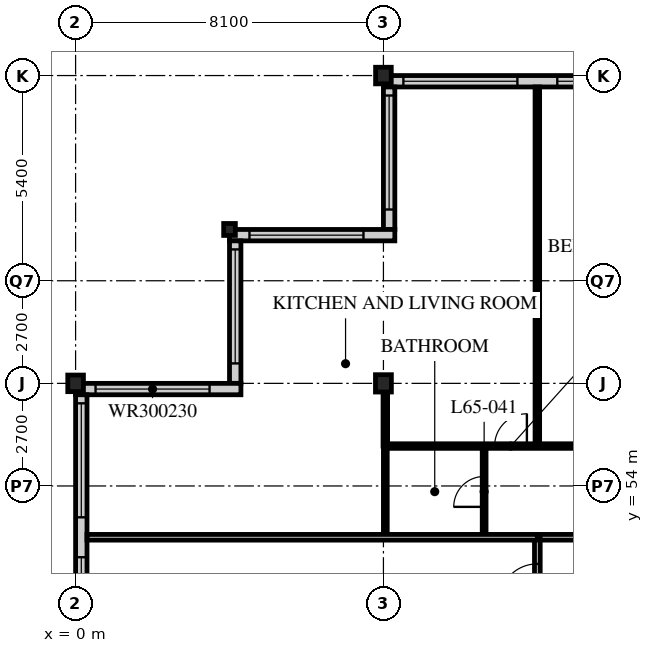
"""IFC4 building model, lengths in metres.
Left out: names, types, materials, properties, quantities, classifications, styles, units other than length and angle.
Written with IfcOpenShell. Run it as: python <this file> out.ifc"""

import sys

from ifc_helpers import new_model, si_unit, direction, frame, frame_2d, origin, origin_2d, place, context, subcontext, project, spatial, rectangle, i_section, extrude, element, fill, save


model = new_model("IFC4")
c1 = context("Model", 3, precision=1e-05, world=origin(), true_north=direction((0.0, 1.0)))
c2 = subcontext(c1, "Body", "Model", "MODEL_VIEW")
j1 = project(units=[si_unit("LENGTHUNIT", "METRE"), si_unit("PLANEANGLEUNIT", "RADIAN")], contexts=[c1])
p1 = place(None, origin())
s1 = spatial("IfcSite", under=j1, at=p1, CompositionType="ELEMENT")
p2 = place(p1, origin())
s2 = spatial("IfcBuilding", under=s1, at=p2, CompositionType="ELEMENT")
p3 = place(p2, frame((0.0, 0.0, 254.1)))
s3 = spatial("IfcBuildingStorey", under=s2, at=p3, CompositionType="ELEMENT", Elevation=254.1)
p4 = place(p3, frame((0.0, 56.7, 0.0), z_axis=(0.0, 0.0, 1.0), x_axis=(1.0, 0.0, 0.0)))
e1 = element("IfcColumn", 1, at=p4, inside=s3, PredefinedType="COLUMN", context=c2, shape_type="SweptSolid", body=[
    extrude(i_section(OverallWidth=0.412, OverallDepth=0.437, WebThickness=0.036, FlangeThickness=0.058, FilletRadius=0.015, at=origin_2d()), origin(), (0.0, 0.0, 1.0), 3.9),
])
p5 = place(p3, frame((4.05, 60.75, 0.0), z_axis=(0.0, 0.0, 1.0), x_axis=(1.0, 0.0, 0.0)))
e2 = element("IfcColumn", 2, at=p5, inside=s3, PredefinedType="COLUMN", context=c2, shape_type="SweptSolid", body=[
    extrude(i_section(OverallWidth=0.307, OverallDepth=0.314, WebThickness=0.012, FlangeThickness=0.019, FilletRadius=0.015, at=origin_2d()), origin(), (0.0, 0.0, 1.0), 3.9),
])
p6 = place(p3, frame((8.1, 56.7, 0.0), z_axis=(0.0, 0.0, 1.0), x_axis=(1.0, 0.0, 0.0)))
e3 = element("IfcColumn", 3, at=p6, inside=s3, PredefinedType="COLUMN", context=c2, shape_type="SweptSolid", body=[
    extrude(i_section(OverallWidth=0.418, OverallDepth=0.456, WebThickness=0.042, FlangeThickness=0.067, FilletRadius=0.015, at=origin_2d()), origin(), (0.0, 0.0, 1.0), 3.9),
])
p7 = place(p3, frame((8.1, 64.8, 0.0), z_axis=(0.0, 0.0, 1.0), x_axis=(1.0, 0.0, 0.0)))
e4 = element("IfcColumn", 4, at=p7, inside=s3, PredefinedType="COLUMN", context=c2, shape_type="SweptSolid", body=[
    extrude(i_section(OverallWidth=0.412, OverallDepth=0.437, WebThickness=0.036, FlangeThickness=0.058, FilletRadius=0.015, at=origin_2d()), origin(), (0.0, 0.0, 1.0), 3.9),
])
p8 = place(p3, frame((48.3, 64.65, 0.0), z_axis=(0.0, 0.0, 1.0), x_axis=(-1.0, 0.0, 0.0)))
e5 = element("IfcWall", 5, at=p8, inside=s3, PredefinedType="SOLIDWALL", context=c2, shape_type="SweptSolid", body=[
    extrude(rectangle(XDim=40.2, YDim=0.3, at=frame_2d((20.1, 0.0))), origin(), (0.0, 0.0, 1.0), 3.69),
])
p9 = place(p8, frame((0.225, 0.0, 0.6)))
e6 = element("IfcOpeningElement", 6, at=p9, cuts=e5, PredefinedType="OPENING", context=c2, shape_type="SweptSolid", body=[
    extrude(rectangle(XDim=3.0, YDim=2.4, at=frame_2d((1.5, 1.2))), frame((0.0, 0.16, 0.0), z_axis=(0.0, -1.0, 0.0), x_axis=(1.0, 0.0, 0.0)), (0.0, 0.0, 1.0), 0.32),
])
p10 = place(p8, frame((4.275, 0.0, 0.6)))
e7 = element("IfcOpeningElement", 7, at=p10, cuts=e5, PredefinedType="OPENING", context=c2, shape_type="SweptSolid", body=[
    extrude(rectangle(XDim=3.0, YDim=2.4, at=frame_2d((1.5, 1.2))), frame((0.0, 0.16, 0.0), z_axis=(0.0, -1.0, 0.0), x_axis=(1.0, 0.0, 0.0)), (0.0, 0.0, 1.0), 0.32),
])
p11 = place(p8, frame((8.325, 0.0, 0.6)))
e8 = element("IfcOpeningElement", 8, at=p11, cuts=e5, PredefinedType="OPENING", context=c2, shape_type="SweptSolid", body=[
    extrude(rectangle(XDim=3.0, YDim=2.4, at=frame_2d((1.5, 1.2))), frame((0.0, 0.16, 0.0), z_axis=(0.0, -1.0, 0.0), x_axis=(1.0, 0.0, 0.0)), (0.0, 0.0, 1.0), 0.32),
])
p12 = place(p8, frame((12.375, 0.0, 0.6)))
e9 = element("IfcOpeningElement", 9, at=p12, cuts=e5, PredefinedType="OPENING", context=c2, shape_type="SweptSolid", body=[
    extrude(rectangle(XDim=3.0, YDim=2.4, at=frame_2d((1.5, 1.2))), frame((0.0, 0.16, 0.0), z_axis=(0.0, -1.0, 0.0), x_axis=(1.0, 0.0, 0.0)), (0.0, 0.0, 1.0), 0.32),
])
p13 = place(p8, frame((16.425, 0.0, 0.6)))
e10 = element("IfcOpeningElement", 10, at=p13, cuts=e5, PredefinedType="OPENING", context=c2, shape_type="SweptSolid", body=[
    extrude(rectangle(XDim=3.0, YDim=2.4, at=frame_2d((1.5, 1.2))), frame((0.0, 0.16, 0.0), z_axis=(0.0, -1.0, 0.0), x_axis=(1.0, 0.0, 0.0)), (0.0, 0.0, 1.0), 0.32),
])
p14 = place(p8, frame((20.475, 0.0, 0.6)))
e11 = element("IfcOpeningElement", 11, at=p14, cuts=e5, PredefinedType="OPENING", context=c2, shape_type="SweptSolid", body=[
    extrude(rectangle(XDim=3.0, YDim=2.4, at=frame_2d((1.5, 1.2))), frame((0.0, 0.16, 0.0), z_axis=(0.0, -1.0, 0.0), x_axis=(1.0, 0.0, 0.0)), (0.0, 0.0, 1.0), 0.32),
])
p15 = place(p8, frame((24.525, 0.0, 0.6)))
e12 = element("IfcOpeningElement", 12, at=p15, cuts=e5, PredefinedType="OPENING", context=c2, shape_type="SweptSolid", body=[
    extrude(rectangle(XDim=3.0, YDim=2.4, at=frame_2d((1.5, 1.2))), frame((0.0, 0.16, 0.0), z_axis=(0.0, -1.0, 0.0), x_axis=(1.0, 0.0, 0.0)), (0.0, 0.0, 1.0), 0.32),
])
p16 = place(p8, frame((28.575, 0.0, 0.6)))
e13 = element("IfcOpeningElement", 13, at=p16, cuts=e5, PredefinedType="OPENING", context=c2, shape_type="SweptSolid", body=[
    extrude(rectangle(XDim=3.0, YDim=2.4, at=frame_2d((1.5, 1.2))), frame((0.0, 0.16, 0.0), z_axis=(0.0, -1.0, 0.0), x_axis=(1.0, 0.0, 0.0)), (0.0, 0.0, 1.0), 0.32),
])
p17 = place(p8, frame((32.625, 0.0, 0.6)))
e14 = element("IfcOpeningElement", 14, at=p17, cuts=e5, PredefinedType="OPENING", context=c2, shape_type="SweptSolid", body=[
    extrude(rectangle(XDim=3.0, YDim=2.4, at=frame_2d((1.5, 1.2))), frame((0.0, 0.16, 0.0), z_axis=(0.0, -1.0, 0.0), x_axis=(1.0, 0.0, 0.0)), (0.0, 0.0, 1.0), 0.32),
])
p18 = place(p8, frame((36.675, 0.0, 0.6)))
e15 = element("IfcOpeningElement", 15, at=p18, cuts=e5, PredefinedType="OPENING", context=c2, shape_type="SweptSolid", body=[
    extrude(rectangle(XDim=3.0, YDim=2.4, at=frame_2d((1.5, 1.2))), frame((0.0, 0.16, 0.0), z_axis=(0.0, -1.0, 0.0), x_axis=(1.0, 0.0, 0.0)), (0.0, 0.0, 1.0), 0.32),
])
p19 = place(p3, frame((8.25, 64.5, 0.0), z_axis=(0.0, 0.0, 1.0), x_axis=(0.0, -1.0, 0.0)))
e16 = element("IfcWall", 16, at=p19, inside=s3, PredefinedType="SOLIDWALL", context=c2, shape_type="SweptSolid", body=[
    extrude(rectangle(XDim=3.75, YDim=0.3, at=frame_2d((1.875, 0.0))), origin(), (0.0, 0.0, 1.0), 3.69),
])
p20 = place(p19, frame((0.225, 0.0, 0.6)))
e17 = element("IfcOpeningElement", 17, at=p20, cuts=e16, PredefinedType="OPENING", context=c2, shape_type="SweptSolid", body=[
    extrude(rectangle(XDim=3.0, YDim=2.3, at=frame_2d((1.5, 1.15))), frame((0.0, 0.16, 0.0), z_axis=(0.0, -1.0, 0.0), x_axis=(1.0, 0.0, 0.0)), (0.0, 0.0, 1.0), 0.32),
])
p21 = place(p3, frame((8.4, 60.6, 0.0), z_axis=(0.0, 0.0, 1.0), x_axis=(-1.0, 0.0, 0.0)))
e18 = element("IfcWall", 18, at=p21, inside=s3, PredefinedType="SOLIDWALL", context=c2, shape_type="SweptSolid", body=[
    extrude(rectangle(XDim=4.35, YDim=0.3, at=frame_2d((2.175, 0.0))), origin(), (0.0, 0.0, 1.0), 3.69),
])
p22 = place(p21, frame((0.825, 0.0, 0.6)))
e19 = element("IfcOpeningElement", 19, at=p22, cuts=e18, PredefinedType="OPENING", context=c2, shape_type="SweptSolid", body=[
    extrude(rectangle(XDim=3.0, YDim=2.3, at=frame_2d((1.5, 1.15))), frame((0.0, 0.16, 0.0), z_axis=(0.0, -1.0, 0.0), x_axis=(1.0, 0.0, 0.0)), (0.0, 0.0, 1.0), 0.32),
])
p23 = place(p3, frame((4.2, 60.45, 0.0), z_axis=(0.0, 0.0, 1.0), x_axis=(0.0, -1.0, 0.0)))
e20 = element("IfcWall", 20, at=p23, inside=s3, PredefinedType="SOLIDWALL", context=c2, shape_type="SweptSolid", body=[
    extrude(rectangle(XDim=3.75, YDim=0.3, at=frame_2d((1.875, 0.0))), origin(), (0.0, 0.0, 1.0), 3.69),
])
p24 = place(p23, frame((0.225, 0.0, 0.6)))
e21 = element("IfcOpeningElement", 21, at=p24, cuts=e20, PredefinedType="OPENING", context=c2, shape_type="SweptSolid", body=[
    extrude(rectangle(XDim=3.0, YDim=2.3, at=frame_2d((1.5, 1.15))), frame((0.0, 0.16, 0.0), z_axis=(0.0, -1.0, 0.0), x_axis=(1.0, 0.0, 0.0)), (0.0, 0.0, 1.0), 0.32),
])
p25 = place(p3, frame((4.35, 56.55, 0.0), z_axis=(0.0, 0.0, 1.0), x_axis=(-1.0, 0.0, 0.0)))
e22 = element("IfcWall", 22, at=p25, inside=s3, PredefinedType="SOLIDWALL", context=c2, shape_type="SweptSolid", body=[
    extrude(rectangle(XDim=4.35, YDim=0.3, at=frame_2d((2.175, 0.0))), origin(), (0.0, 0.0, 1.0), 3.69),
])
p26 = place(p25, frame((0.825, 0.0, 0.6)))
e23 = element("IfcOpeningElement", 23, at=p26, cuts=e22, PredefinedType="OPENING", context=c2, shape_type="SweptSolid", body=[
    extrude(rectangle(XDim=3.0, YDim=2.3, at=frame_2d((1.5, 1.15))), frame((0.0, 0.16, 0.0), z_axis=(0.0, -1.0, 0.0), x_axis=(1.0, 0.0, 0.0)), (0.0, 0.0, 1.0), 0.32),
])
p27 = place(p3, frame((0.15, 56.4, 0.0), z_axis=(0.0, 0.0, 1.0), x_axis=(0.0, -1.0, 0.0)))
e24 = element("IfcWall", 24, at=p27, inside=s3, PredefinedType="SOLIDWALL", context=c2, shape_type="SweptSolid", body=[
    extrude(rectangle(XDim=32.1, YDim=0.3, at=frame_2d((16.05, 0.0))), origin(), (0.0, 0.0, 1.0), 3.69),
])
p28 = place(p27, frame((0.225, 0.0, 0.6)))
e25 = element("IfcOpeningElement", 25, at=p28, cuts=e24, PredefinedType="OPENING", context=c2, shape_type="SweptSolid", body=[
    extrude(rectangle(XDim=3.0, YDim=2.4, at=frame_2d((1.5, 1.2))), frame((0.0, 0.16, 0.0), z_axis=(0.0, -1.0, 0.0), x_axis=(1.0, 0.0, 0.0)), (0.0, 0.0, 1.0), 0.32),
])
p29 = place(p27, frame((4.275, 0.0, 0.6)))
e26 = element("IfcOpeningElement", 26, at=p29, cuts=e24, PredefinedType="OPENING", context=c2, shape_type="SweptSolid", body=[
    extrude(rectangle(XDim=3.0, YDim=2.4, at=frame_2d((1.5, 1.2))), frame((0.0, 0.16, 0.0), z_axis=(0.0, -1.0, 0.0), x_axis=(1.0, 0.0, 0.0)), (0.0, 0.0, 1.0), 0.32),
])
p30 = place(p27, frame((8.325, 0.0, 0.6)))
e27 = element("IfcOpeningElement", 27, at=p30, cuts=e24, PredefinedType="OPENING", context=c2, shape_type="SweptSolid", body=[
    extrude(rectangle(XDim=3.0, YDim=2.4, at=frame_2d((1.5, 1.2))), frame((0.0, 0.16, 0.0), z_axis=(0.0, -1.0, 0.0), x_axis=(1.0, 0.0, 0.0)), (0.0, 0.0, 1.0), 0.32),
])
p31 = place(p27, frame((12.375, 0.0, 0.6)))
e28 = element("IfcOpeningElement", 28, at=p31, cuts=e24, PredefinedType="OPENING", context=c2, shape_type="SweptSolid", body=[
    extrude(rectangle(XDim=3.0, YDim=2.4, at=frame_2d((1.5, 1.2))), frame((0.0, 0.16, 0.0), z_axis=(0.0, -1.0, 0.0), x_axis=(1.0, 0.0, 0.0)), (0.0, 0.0, 1.0), 0.32),
])
p32 = place(p27, frame((16.425, 0.0, 0.6)))
e29 = element("IfcOpeningElement", 29, at=p32, cuts=e24, PredefinedType="OPENING", context=c2, shape_type="SweptSolid", body=[
    extrude(rectangle(XDim=3.0, YDim=2.4, at=frame_2d((1.5, 1.2))), frame((0.0, 0.16, 0.0), z_axis=(0.0, -1.0, 0.0), x_axis=(1.0, 0.0, 0.0)), (0.0, 0.0, 1.0), 0.32),
])
p33 = place(p27, frame((20.475, 0.0, 0.6)))
e30 = element("IfcOpeningElement", 30, at=p33, cuts=e24, PredefinedType="OPENING", context=c2, shape_type="SweptSolid", body=[
    extrude(rectangle(XDim=3.0, YDim=2.4, at=frame_2d((1.5, 1.2))), frame((0.0, 0.16, 0.0), z_axis=(0.0, -1.0, 0.0), x_axis=(1.0, 0.0, 0.0)), (0.0, 0.0, 1.0), 0.32),
])
p34 = place(p27, frame((24.525, 0.0, 0.6)))
e31 = element("IfcOpeningElement", 31, at=p34, cuts=e24, PredefinedType="OPENING", context=c2, shape_type="SweptSolid", body=[
    extrude(rectangle(XDim=3.0, YDim=2.4, at=frame_2d((1.5, 1.2))), frame((0.0, 0.16, 0.0), z_axis=(0.0, -1.0, 0.0), x_axis=(1.0, 0.0, 0.0)), (0.0, 0.0, 1.0), 0.32),
])
p35 = place(p27, frame((28.575, 0.0, 0.6)))
e32 = element("IfcOpeningElement", 32, at=p35, cuts=e24, PredefinedType="OPENING", context=c2, shape_type="SweptSolid", body=[
    extrude(rectangle(XDim=3.0, YDim=2.4, at=frame_2d((1.5, 1.2))), frame((0.0, 0.16, 0.0), z_axis=(0.0, -1.0, 0.0), x_axis=(1.0, 0.0, 0.0)), (0.0, 0.0, 1.0), 0.32),
])
p36 = place(p3, frame((12.15, 52.65, 0.0), z_axis=(0.0, 0.0, 1.0), x_axis=(1.0, 0.0, 0.0)))
e33 = element("IfcWall", 33, at=p36, inside=s3, PredefinedType="PARTITIONING", context=c2, shape_type="SweptSolid", body=[
    extrude(rectangle(XDim=24.3, YDim=0.15, at=frame_2d((12.15, 0.0))), origin(), (0.0, 0.0, 1.0), 3.69),
])
p37 = place(p36, frame((4.45, 0.0, 0.0)))
e34 = element("IfcOpeningElement", 34, at=p37, cuts=e33, PredefinedType="OPENING", context=c2, shape_type="SweptSolid", body=[
    extrude(rectangle(XDim=1.0, YDim=2.1, at=frame_2d((0.5, 1.05))), frame((0.0, 0.085, 0.0), z_axis=(0.0, -1.0, 0.0), x_axis=(1.0, 0.0, 0.0)), (0.0, 0.0, 1.0), 0.17),
])
p38 = place(p36, frame((1.525, 0.0, 0.0)))
e35 = element("IfcOpeningElement", 35, at=p38, cuts=e33, PredefinedType="OPENING", context=c2, shape_type="SweptSolid", body=[
    extrude(rectangle(XDim=1.0, YDim=2.1, at=frame_2d((0.5, 1.05))), frame((0.0, 0.085, 0.0), z_axis=(0.0, -1.0, 0.0), x_axis=(1.0, 0.0, 0.0)), (0.0, 0.0, 1.0), 0.17),
])
p39 = place(p3, frame((12.15, 22.5, 0.0), z_axis=(0.0, 0.0, 1.0), x_axis=(0.0, 1.0, 0.0)))
e36 = element("IfcWall", 36, at=p39, inside=s3, PredefinedType="PARTITIONING", context=c2, shape_type="SweptSolid", body=[
    extrude(rectangle(XDim=30.15, YDim=0.15, at=frame_2d((15.075, 0.0))), origin(), (0.0, 0.0, 1.0), 3.69),
])
p40 = place(p39, frame((0.4, 0.0, 0.0)))
e37 = element("IfcOpeningElement", 37, at=p40, cuts=e36, PredefinedType="OPENING", context=c2, shape_type="SweptSolid", body=[
    extrude(rectangle(XDim=1.0, YDim=2.1, at=frame_2d((0.5, 1.05))), frame((0.0, 0.085, 0.0), z_axis=(0.0, -1.0, 0.0), x_axis=(1.0, 0.0, 0.0)), (0.0, 0.0, 1.0), 0.17),
])
p41 = place(p39, frame((24.4, 0.0, 0.0)))
e38 = element("IfcOpeningElement", 38, at=p41, cuts=e36, PredefinedType="OPENING", context=c2, shape_type="SweptSolid", body=[
    extrude(rectangle(XDim=1.0, YDim=2.1, at=frame_2d((0.5, 1.05))), frame((0.0, 0.085, 0.0), z_axis=(0.0, -1.0, 0.0), x_axis=(1.0, 0.0, 0.0)), (0.0, 0.0, 1.0), 0.17),
])
p42 = place(p39, frame((28.45, 0.0, 0.0)))
e39 = element("IfcOpeningElement", 39, at=p42, cuts=e36, PredefinedType="OPENING", context=c2, shape_type="SweptSolid", body=[
    extrude(rectangle(XDim=1.0, YDim=2.1, at=frame_2d((0.5, 1.05))), frame((0.0, 0.085, 0.0), z_axis=(0.0, -1.0, 0.0), x_axis=(1.0, 0.0, 0.0)), (0.0, 0.0, 1.0), 0.17),
])
p43 = place(p3, frame((10.75, 52.65, 0.0), z_axis=(0.0, 0.0, 1.0), x_axis=(0.0, 1.0, 0.0)))
e40 = element("IfcWall", 40, at=p43, inside=s3, PredefinedType="PARTITIONING", context=c2, shape_type="SweptSolid", body=[
    extrude(rectangle(XDim=2.4, YDim=0.1, at=frame_2d((1.2, 0.0))), origin(), (0.0, 0.0, 1.0), 3.69),
])
p44 = place(p43, frame((0.8, 0.0, 0.0)))
e41 = element("IfcOpeningElement", 41, at=p44, cuts=e40, PredefinedType="OPENING", context=c2, shape_type="SweptSolid", body=[
    extrude(rectangle(XDim=0.8, YDim=2.1, at=frame_2d((0.4, 1.05))), frame((0.0, 0.06, 0.0), z_axis=(0.0, -1.0, 0.0), x_axis=(1.0, 0.0, 0.0)), (0.0, 0.0, 1.0), 0.12),
])
p45 = place(p3, frame((8.15, 52.65, 0.0), z_axis=(0.0, 0.0, 1.0), x_axis=(0.0, 1.0, 0.0)))
e42 = element("IfcWall", 42, at=p45, inside=s3, PredefinedType="PARTITIONING", context=c2, shape_type="SweptSolid", body=[
    extrude(rectangle(XDim=2.4, YDim=0.1, at=frame_2d((1.2, 0.0))), origin(), (0.0, 0.0, 1.0), 3.078),
])
p46 = place(p3, frame((8.15, 55.05, 0.0), z_axis=(0.0, 0.0, 1.0), x_axis=(1.0, 0.0, 0.0)))
e43 = element("IfcWall", 43, at=p46, inside=s3, PredefinedType="PARTITIONING", context=c2, shape_type="SweptSolid", body=[
    extrude(rectangle(XDim=28.3, YDim=0.12, at=frame_2d((14.15, 0.0))), origin(), (0.0, 0.0, 1.0), 3.69),
])
p47 = place(p46, frame((9.025, 0.0, 0.0)))
e44 = element("IfcOpeningElement", 44, at=p47, cuts=e43, PredefinedType="OPENING", context=c2, shape_type="SweptSolid", body=[
    extrude(rectangle(XDim=0.85, YDim=2.1, at=frame_2d((0.425, 1.05))), frame((0.0, 0.07, 0.0), z_axis=(0.0, -1.0, 0.0), x_axis=(1.0, 0.0, 0.0)), (0.0, 0.0, 1.0), 0.14),
])
p48 = place(p46, frame((16.475, 0.0, 0.0)))
e45 = element("IfcOpeningElement", 45, at=p48, cuts=e43, PredefinedType="OPENING", context=c2, shape_type="SweptSolid", body=[
    extrude(rectangle(XDim=0.85, YDim=2.1, at=frame_2d((0.425, 1.05))), frame((0.0, 0.07, 0.0), z_axis=(0.0, -1.0, 0.0), x_axis=(1.0, 0.0, 0.0)), (0.0, 0.0, 1.0), 0.14),
])
p49 = place(p46, frame((20.525, 0.0, 0.0)))
e46 = element("IfcOpeningElement", 46, at=p49, cuts=e43, PredefinedType="OPENING", context=c2, shape_type="SweptSolid", body=[
    extrude(rectangle(XDim=0.85, YDim=2.1, at=frame_2d((0.425, 1.05))), frame((0.0, 0.07, 0.0), z_axis=(0.0, -1.0, 0.0), x_axis=(1.0, 0.0, 0.0)), (0.0, 0.0, 1.0), 0.14),
])
p50 = place(p46, frame((24.575, 0.0, 0.0)))
e47 = element("IfcOpeningElement", 47, at=p50, cuts=e43, PredefinedType="OPENING", context=c2, shape_type="SweptSolid", body=[
    extrude(rectangle(XDim=0.85, YDim=2.1, at=frame_2d((0.425, 1.05))), frame((0.0, 0.07, 0.0), z_axis=(0.0, -1.0, 0.0), x_axis=(1.0, 0.0, 0.0)), (0.0, 0.0, 1.0), 0.14),
])
p51 = place(p46, frame((6.725, 0.0, 0.0)))
e48 = element("IfcOpeningElement", 48, at=p51, cuts=e43, PredefinedType="OPENING", context=c2, shape_type="SweptSolid", body=[
    extrude(rectangle(XDim=0.85, YDim=2.1, at=frame_2d((0.425, 1.05))), frame((0.0, 0.07, 0.0), z_axis=(0.0, -1.0, 0.0), x_axis=(1.0, 0.0, 0.0)), (0.0, 0.0, 1.0), 0.14),
])
p52 = place(p46, frame((2.875, 0.0, 0.0)))
e49 = element("IfcOpeningElement", 49, at=p52, cuts=e43, PredefinedType="OPENING", context=c2, shape_type="SweptSolid", body=[
    extrude(rectangle(XDim=0.85, YDim=2.1, at=frame_2d((0.425, 1.05))), frame((0.0, 0.07, 0.0), z_axis=(0.0, -1.0, 0.0), x_axis=(1.0, 0.0, 0.0)), (0.0, 0.0, 1.0), 0.14),
])
p53 = place(p3, frame((12.15, 55.05, 0.0), z_axis=(0.0, 0.0, 1.0), x_axis=(0.0, 1.0, 0.0)))
e50 = element("IfcWall", 50, at=p53, inside=s3, PredefinedType="PARTITIONING", context=c2, shape_type="SweptSolid", body=[
    extrude(rectangle(XDim=9.45, YDim=0.12, at=frame_2d((4.725, 0.0))), origin(), (0.0, 0.0, 1.0), 3.69),
])
p54 = place(p3, frame((0.3, 52.65, 0.0), z_axis=(0.0, 0.0, 1.0), x_axis=(1.0, 0.0, 0.0)))
e51 = element("IfcWall", 51, at=p54, inside=s3, PredefinedType="PARTITIONING", context=c2, shape_type="SweptSolid", body=[
    extrude(rectangle(XDim=11.85, YDim=0.15, at=frame_2d((5.925, 0.0))), origin(), (0.0, 0.0, 1.0), 3.69),
])
p55 = place(p3, frame((8.15, 55.05, 0.0), z_axis=(0.0, 0.0, 1.0), x_axis=(0.0, 1.0, 0.0)))
e52 = element("IfcWall", 52, at=p55, inside=s3, PredefinedType="PARTITIONING", context=c2, shape_type="SweptSolid", body=[
    extrude(rectangle(XDim=1.447, YDim=0.12, at=frame_2d((0.724, 0.0))), origin(), (0.0, 0.0, 1.0), 3.078),
])
p56 = place(p17, origin())
e53 = element("IfcWindow", 53, at=p56, inside=s3, PartitioningType="SINGLE_PANEL", PredefinedType="WINDOW", context=c2, shape_type="SweptSolid", body=[
    extrude(rectangle(XDim=3.0, YDim=2.4, at=frame_2d((1.5, 1.2))), frame((0.0, 0.03, 0.0), z_axis=(0.0, -1.0, 0.0), x_axis=(1.0, 0.0, 0.0)), (0.0, 0.0, 1.0), 0.06),
])
fill(e14, e53)
p57 = place(p18, origin())
e54 = element("IfcWindow", 54, at=p57, inside=s3, PartitioningType="SINGLE_PANEL", PredefinedType="WINDOW", context=c2, shape_type="SweptSolid", body=[
    extrude(rectangle(XDim=3.0, YDim=2.4, at=frame_2d((1.5, 1.2))), frame((0.0, 0.03, 0.0), z_axis=(0.0, -1.0, 0.0), x_axis=(1.0, 0.0, 0.0)), (0.0, 0.0, 1.0), 0.06),
])
fill(e15, e54)
p58 = place(p20, origin())
e55 = element("IfcWindow", 55, at=p58, inside=s3, PartitioningType="SINGLE_PANEL", PredefinedType="WINDOW", context=c2, shape_type="SweptSolid", body=[
    extrude(rectangle(XDim=3.0, YDim=2.3, at=frame_2d((1.5, 1.15))), frame((0.0, 0.03, 0.0), z_axis=(0.0, -1.0, 0.0), x_axis=(1.0, 0.0, 0.0)), (0.0, 0.0, 1.0), 0.06),
])
fill(e17, e55)
p59 = place(p22, origin())
e56 = element("IfcWindow", 56, at=p59, inside=s3, PartitioningType="SINGLE_PANEL", PredefinedType="WINDOW", context=c2, shape_type="SweptSolid", body=[
    extrude(rectangle(XDim=3.0, YDim=2.3, at=frame_2d((1.5, 1.15))), frame((0.0, 0.03, 0.0), z_axis=(0.0, -1.0, 0.0), x_axis=(1.0, 0.0, 0.0)), (0.0, 0.0, 1.0), 0.06),
])
fill(e19, e56)
p60 = place(p24, origin())
e57 = element("IfcWindow", 57, at=p60, inside=s3, PartitioningType="SINGLE_PANEL", PredefinedType="WINDOW", context=c2, shape_type="SweptSolid", body=[
    extrude(rectangle(XDim=3.0, YDim=2.3, at=frame_2d((1.5, 1.15))), frame((0.0, 0.03, 0.0), z_axis=(0.0, -1.0, 0.0), x_axis=(1.0, 0.0, 0.0)), (0.0, 0.0, 1.0), 0.06),
])
fill(e21, e57)
p61 = place(p26, origin())
e58 = element("IfcWindow", 58, at=p61, inside=s3, PartitioningType="SINGLE_PANEL", PredefinedType="WINDOW", context=c2, shape_type="SweptSolid", body=[
    extrude(rectangle(XDim=3.0, YDim=2.3, at=frame_2d((1.5, 1.15))), frame((0.0, 0.03, 0.0), z_axis=(0.0, -1.0, 0.0), x_axis=(1.0, 0.0, 0.0)), (0.0, 0.0, 1.0), 0.06),
])
fill(e23, e58)
p62 = place(p28, origin())
e59 = element("IfcWindow", 59, at=p62, inside=s3, PartitioningType="SINGLE_PANEL", PredefinedType="WINDOW", context=c2, shape_type="SweptSolid", body=[
    extrude(rectangle(XDim=3.0, YDim=2.4, at=frame_2d((1.5, 1.2))), frame((0.0, 0.03, 0.0), z_axis=(0.0, -1.0, 0.0), x_axis=(1.0, 0.0, 0.0)), (0.0, 0.0, 1.0), 0.06),
])
fill(e25, e59)
p63 = place(p29, origin())
e60 = element("IfcWindow", 60, at=p63, inside=s3, PartitioningType="SINGLE_PANEL", PredefinedType="WINDOW", context=c2, shape_type="SweptSolid", body=[
    extrude(rectangle(XDim=3.0, YDim=2.4, at=frame_2d((1.5, 1.2))), frame((0.0, 0.03, 0.0), z_axis=(0.0, -1.0, 0.0), x_axis=(1.0, 0.0, 0.0)), (0.0, 0.0, 1.0), 0.06),
])
fill(e26, e60)
p64 = place(p42, origin())
e61 = element("IfcDoor", 61, at=p64, inside=s3, OperationType="SINGLE_SWING_LEFT", PredefinedType="DOOR", context=c2, shape_type="SweptSolid", body=[
    extrude(rectangle(XDim=1.0, YDim=2.1, at=frame_2d((0.5, 1.05))), frame((0.0, 0.025, 0.0), z_axis=(0.0, -1.0, 0.0), x_axis=(1.0, 0.0, 0.0)), (0.0, 0.0, 1.0), 0.05),
])
fill(e39, e61)
p65 = place(p44, origin())
e62 = element("IfcDoor", 62, at=p65, inside=s3, OperationType="SINGLE_SWING_LEFT", PredefinedType="DOOR", context=c2, shape_type="SweptSolid", body=[
    extrude(rectangle(XDim=0.8, YDim=2.1, at=frame_2d((0.4, 1.05))), frame((0.0, 0.025, 0.0), z_axis=(0.0, -1.0, 0.0), x_axis=(1.0, 0.0, 0.0)), (0.0, 0.0, 1.0), 0.05),
])
fill(e41, e62)
p66 = place(p52, origin())
e63 = element("IfcDoor", 63, at=p66, inside=s3, OperationType="SINGLE_SWING_RIGHT", PredefinedType="DOOR", context=c2, shape_type="SweptSolid", body=[
    extrude(rectangle(XDim=0.85, YDim=2.1, at=frame_2d((0.425, 1.05))), frame((0.0, 0.025, 0.0), z_axis=(0.0, -1.0, 0.0), x_axis=(1.0, 0.0, 0.0)), (0.0, 0.0, 1.0), 0.05),
])
fill(e49, e63)
save(model, sys.argv[1])
